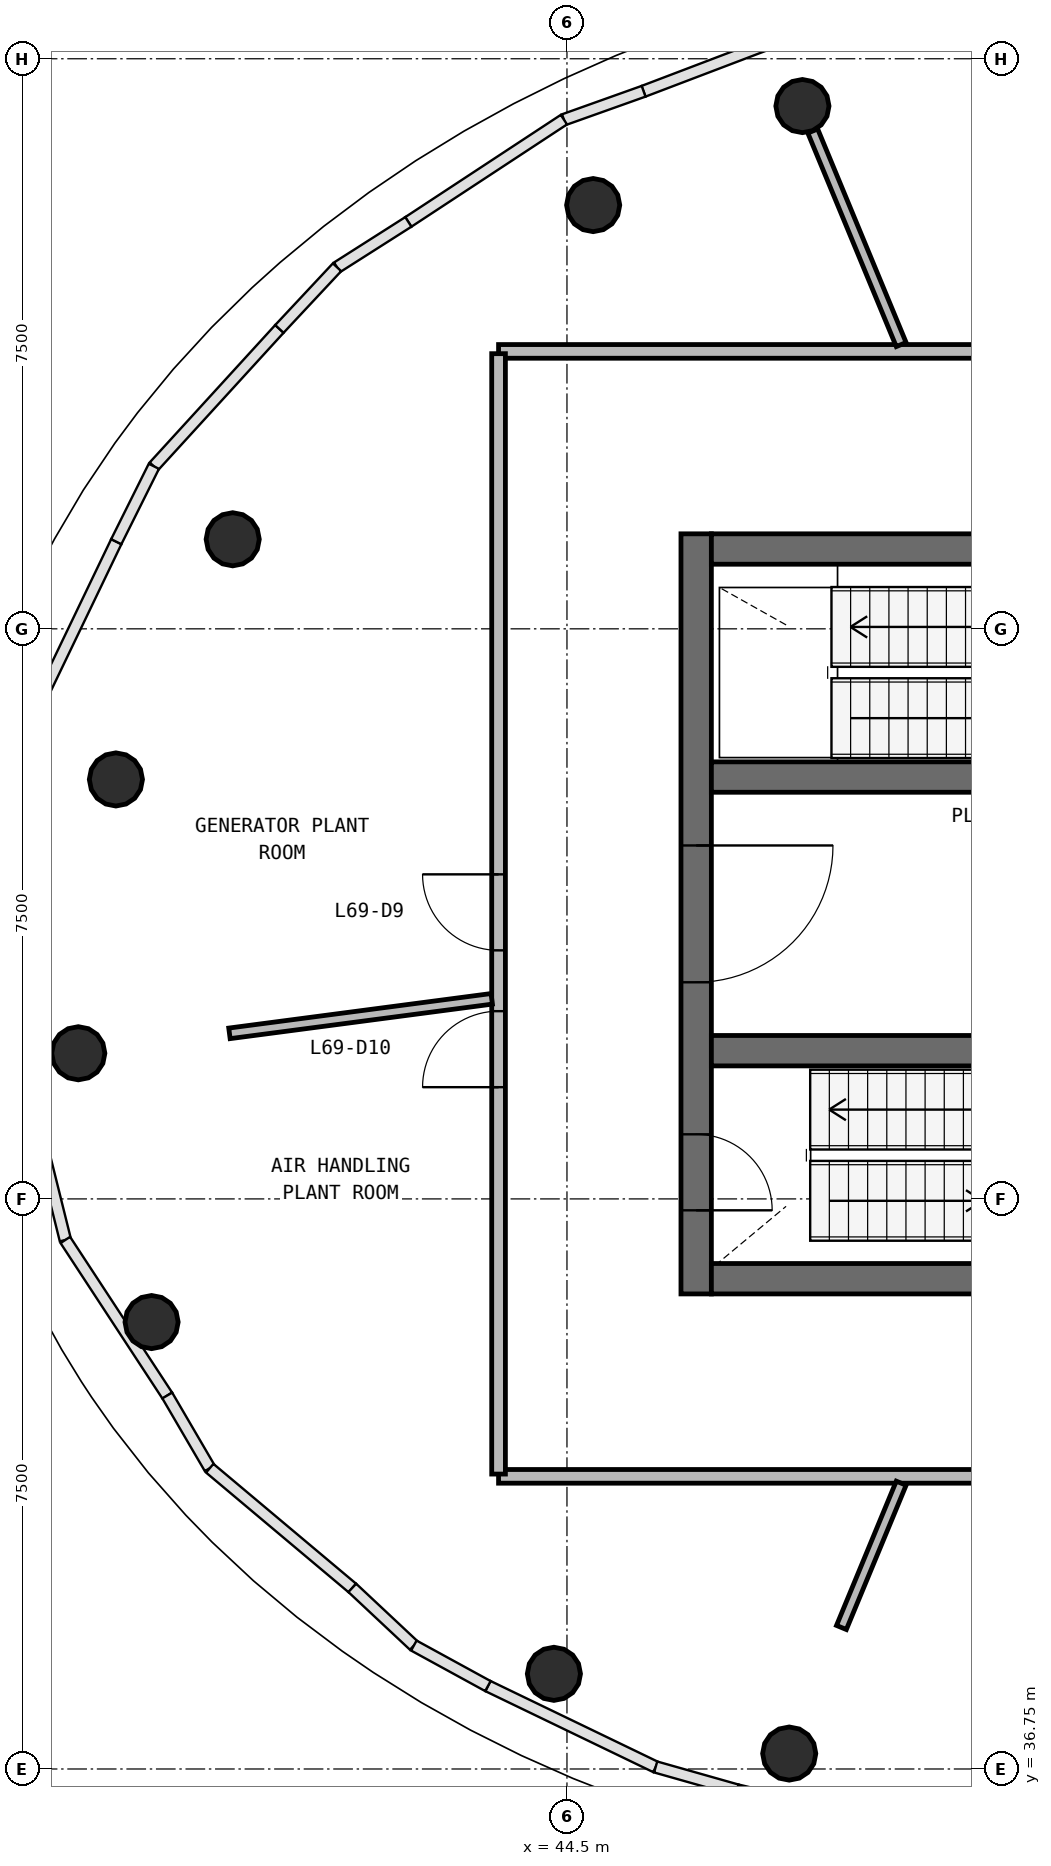
"""IFC4 building model, lengths in metres.
Left out: names, types, materials, properties, quantities, classifications, styles, units other than length and angle.
Written with IfcOpenShell. Run it as: python <this file> out.ifc"""

import sys

from ifc_helpers import new_model, si_unit, direction, frame, frame_2d, origin, origin_2d, place, context, subcontext, project, spatial, rectangle, circle, extrude, source, transform, mapped, element, fill, save


model = new_model("IFC4")
c1 = context("Model", 3, precision=1e-05, world=origin(), true_north=direction((0.0, 1.0)))
c2 = subcontext(c1, "Body", "Model", "MODEL_VIEW")
j1 = project(units=[si_unit("LENGTHUNIT", "METRE"), si_unit("PLANEANGLEUNIT", "RADIAN")], contexts=[c1])
p1 = place(None, origin())
s1 = spatial("IfcSite", under=j1, at=p1, CompositionType="ELEMENT")
p2 = place(p1, origin())
s2 = spatial("IfcBuilding", under=s1, at=p2, CompositionType="ELEMENT")
p3 = place(p2, frame((0.0, 0.0, 280.1)))
s3 = spatial("IfcBuildingStorey", under=s2, at=p3, CompositionType="ELEMENT", Elevation=280.1)
p4 = place(p3, frame((46.2, 53.0, 0.0), z_axis=(0.0, 0.0, 1.0), x_axis=(0.0, -1.0, 0.0)))
e1 = element("IfcWall", 1, at=p4, inside=s3, PredefinedType="SHEAR", context=c2, shape_type="SweptSolid", body=[
    extrude(rectangle(XDim=10.0, YDim=0.4, at=frame_2d((5.0, 0.0))), origin(), (0.0, 0.0, 1.0), 3.5),
])
p5 = place(p4, frame((4.1, 0.0, 0.0)))
e2 = element("IfcOpeningElement", 2, at=p5, cuts=e1, PredefinedType="OPENING", context=c2, shape_type="SweptSolid", body=[
    extrude(rectangle(XDim=1.8, YDim=2.1, at=frame_2d((0.9, 1.05))), frame((0.0, 0.21, 0.0), z_axis=(0.0, -1.0, 0.0), x_axis=(1.0, 0.0, 0.0)), (0.0, 0.0, 1.0), 0.42),
])
p6 = place(p4, frame((7.9, 0.0, 0.0)))
e3 = element("IfcOpeningElement", 3, at=p6, cuts=e1, PredefinedType="OPENING", context=c2, shape_type="SweptSolid", body=[
    extrude(rectangle(XDim=1.0, YDim=2.1, at=frame_2d((0.5, 1.05))), frame((0.0, 0.21, 0.0), z_axis=(0.0, -1.0, 0.0), x_axis=(1.0, 0.0, 0.0)), (0.0, 0.0, 1.0), 0.42),
])
p7 = place(p3, frame((46.4, 43.2, 0.0), z_axis=(0.0, 0.0, 1.0), x_axis=(1.0, 0.0, 0.0)))
e4 = element("IfcWall", 4, at=p7, inside=s3, PredefinedType="SHEAR", context=c2, shape_type="SweptSolid", body=[
    extrude(rectangle(XDim=11.2, YDim=0.4, at=frame_2d((5.6, 0.0))), origin(), (0.0, 0.0, 1.0), 3.5),
])
p8 = place(p3, frame((57.6, 52.8, 0.0), z_axis=(0.0, 0.0, 1.0), x_axis=(-1.0, 0.0, 0.0)))
e5 = element("IfcWall", 5, at=p8, inside=s3, PredefinedType="SHEAR", context=c2, shape_type="SweptSolid", body=[
    extrude(rectangle(XDim=11.2, YDim=0.4, at=frame_2d((5.6, 0.0))), origin(), (0.0, 0.0, 1.0), 3.5),
])
p9 = place(p8, frame((6.1, 0.0, 0.0)))
e6 = element("IfcOpeningElement", 6, at=p9, cuts=e5, PredefinedType="OPENING", context=c2, shape_type="SweptSolid", body=[
    extrude(rectangle(XDim=1.0, YDim=2.1, at=frame_2d((0.5, 1.05))), frame((0.0, 0.21, 0.0), z_axis=(0.0, -1.0, 0.0), x_axis=(1.0, 0.0, 0.0)), (0.0, 0.0, 1.0), 0.42),
])
p10 = place(p3, frame((46.4, 49.8, 0.0), z_axis=(0.0, 0.0, 1.0), x_axis=(1.0, 0.0, 0.0)))
e7 = element("IfcWall", 7, at=p10, inside=s3, PredefinedType="SHEAR", context=c2, shape_type="SweptSolid", body=[
    extrude(rectangle(XDim=11.2, YDim=0.4, at=frame_2d((5.6, 0.0))), origin(), (0.0, 0.0, 1.0), 3.5),
])
p11 = place(p10, frame((8.95, 0.0, 0.0)))
e8 = element("IfcOpeningElement", 8, at=p11, cuts=e7, PredefinedType="OPENING", context=c2, shape_type="SweptSolid", body=[
    extrude(rectangle(XDim=1.1, YDim=2.1, at=frame_2d((0.55, 1.05))), frame((0.0, 0.21, 0.0), z_axis=(0.0, -1.0, 0.0), x_axis=(1.0, 0.0, 0.0)), (0.0, 0.0, 1.0), 0.42),
])
p12 = place(p10, frame((5.65, 0.0, 0.0)))
e9 = element("IfcOpeningElement", 9, at=p12, cuts=e7, PredefinedType="OPENING", context=c2, shape_type="SweptSolid", body=[
    extrude(rectangle(XDim=0.9, YDim=2.1, at=frame_2d((0.45, 1.05))), frame((0.0, 0.21, 0.0), z_axis=(0.0, -1.0, 0.0), x_axis=(1.0, 0.0, 0.0)), (0.0, 0.0, 1.0), 0.42),
])
p13 = place(p3, frame((46.4, 46.2, 0.0), z_axis=(0.0, 0.0, 1.0), x_axis=(1.0, 0.0, 0.0)))
e10 = element("IfcWall", 10, at=p13, inside=s3, PredefinedType="SHEAR", context=c2, shape_type="SweptSolid", body=[
    extrude(rectangle(XDim=11.2, YDim=0.4, at=frame_2d((5.6, 0.0))), origin(), (0.0, 0.0, 1.0), 3.5),
])
p14 = place(p13, frame((5.65, 0.0, 0.0)))
e11 = element("IfcOpeningElement", 11, at=p14, cuts=e10, PredefinedType="OPENING", context=c2, shape_type="SweptSolid", body=[
    extrude(rectangle(XDim=0.9, YDim=2.1, at=frame_2d((0.45, 1.05))), frame((0.0, 0.21, 0.0), z_axis=(0.0, -1.0, 0.0), x_axis=(1.0, 0.0, 0.0)), (0.0, 0.0, 1.0), 0.42),
])
m1 = source(origin(), c2, "Body", "SweptSolid", [
    extrude(circle(Radius=0.35, at=origin_2d()), origin(), (0.0, 0.0, 1.0), 3.747),
])
p15 = place(p3, frame((47.598, 58.628, 0.128), z_axis=(0.136574670104, -0.329773094178, 0.934129041323), x_axis=(0.923901142315, 0.382631257517, 0.0)))
e12 = element("IfcColumn", 12, at=p15, inside=s3, PredefinedType="COLUMN", context=c2, shape_type="MappedRepresentation", body=[
    mapped(m1, transform((0.0, 0.0, 0.0), scale=1.0)),
])
m2 = source(origin(), c2, "Body", "SweptSolid", [
    extrude(circle(Radius=0.35, at=origin_2d()), origin(), (0.0, 0.0, 1.0), 3.739),
])
p16 = place(p3, frame((44.845, 57.325, 0.126), z_axis=(0.213995199353, -0.278905552773, 0.936171857773), x_axis=(0.793376088289, 0.608731782094, 0.0)))
e13 = element("IfcColumn", 13, at=p16, inside=s3, PredefinedType="COLUMN", context=c2, shape_type="MappedRepresentation", body=[
    mapped(m2, transform((0.0, 0.0, 0.0), scale=1.0)),
])
m3 = source(origin(), c2, "Body", "SweptSolid", [
    extrude(circle(Radius=0.35, at=origin_2d()), origin(), (0.0, 0.0, 1.0), 3.807),
])
p17 = place(p3, frame((40.102, 52.928, 0.141), z_axis=(0.363645996148, -0.150626775693, 0.919278610613), x_axis=(0.382682721486, 0.923879826967, 0.0)))
e14 = element("IfcColumn", 14, at=p17, inside=s3, PredefinedType="COLUMN", context=c2, shape_type="MappedRepresentation", body=[
    mapped(m3, transform((0.0, 0.0, 0.0), scale=1.0)),
])
m4 = source(origin(), c2, "Body", "SweptSolid", [
    extrude(circle(Radius=0.35, at=origin_2d()), origin(), (0.0, 0.0, 1.0), 3.898),
])
p18 = place(p3, frame((38.565, 49.769, 0.157), z_axis=(0.436525820631, -0.057493644669, 0.897852821316), x_axis=(0.130579616175, 0.991437826512, 0.0)))
e15 = element("IfcColumn", 15, at=p18, inside=s3, PredefinedType="COLUMN", context=c2, shape_type="MappedRepresentation", body=[
    mapped(m4, transform((0.0, 0.0, 0.0), scale=1.0)),
])
m5 = source(origin(), c2, "Body", "SweptSolid", [
    extrude(circle(Radius=0.35, at=origin_2d()), origin(), (0.0, 0.0, 1.0), 4.014),
])
p19 = place(p3, frame((38.071, 46.166, 0.174), z_axis=(0.485556516608, 0.063978639212, 0.871860999761), x_axis=(-0.130634394046, 0.991430610326, 0.0)))
e16 = element("IfcColumn", 16, at=p19, inside=s3, PredefinedType="COLUMN", context=c2, shape_type="MappedRepresentation", body=[
    mapped(m5, transform((0.0, 0.0, 0.0), scale=1.0)),
])
m6 = source(origin(), c2, "Body", "SweptSolid", [
    extrude(circle(Radius=0.35, at=origin_2d()), origin(), (0.0, 0.0, 1.0), 4.069),
])
p20 = place(p3, frame((39.035, 42.63, 0.181), z_axis=(0.471313444732, 0.195280710616, 0.860075043747), x_axis=(-0.382777607766, 0.923840518159, 0.0)))
e17 = element("IfcColumn", 17, at=p20, inside=s3, PredefinedType="COLUMN", context=c2, shape_type="MappedRepresentation", body=[
    mapped(m6, transform((0.0, 0.0, 0.0), scale=1.0)),
])
m7 = source(origin(), c2, "Body", "SweptSolid", [
    extrude(circle(Radius=0.35, at=origin_2d()), origin(), (0.0, 0.0, 1.0), 3.908),
])
p21 = place(p3, frame((44.328, 38.002, 0.159), z_axis=(0.270876761649, 0.352901943394, 0.89559254036), x_axis=(-0.793260428126, 0.608882495371, 0.0)))
e18 = element("IfcColumn", 18, at=p21, inside=s3, PredefinedType="COLUMN", context=c2, shape_type="MappedRepresentation", body=[
    mapped(m7, transform((0.0, 0.0, 0.0), scale=1.0)),
])
m8 = source(origin(), c2, "Body", "SweptSolid", [
    extrude(circle(Radius=0.35, at=origin_2d()), origin(), (0.0, 0.0, 1.0), 3.834),
])
p22 = place(p3, frame((47.424, 36.953, 0.146), z_axis=(0.156087835133, 0.377005297426, 0.912964179712), x_axis=(-0.923942661325, 0.382530990356, 0.0)))
e19 = element("IfcColumn", 19, at=p22, inside=s3, PredefinedType="COLUMN", context=c2, shape_type="MappedRepresentation", body=[
    mapped(m8, transform((0.0, 0.0, 0.0), scale=1.0)),
])
p23 = place(p3, frame((43.6, 55.4, 0.0), z_axis=(0.0, 0.0, 1.0), x_axis=(1.0, 0.0, 0.0)))
e20 = element("IfcWall", 20, at=p23, inside=s3, PredefinedType="PARTITIONING", context=c2, shape_type="SweptSolid", body=[
    extrude(rectangle(XDim=16.8, YDim=0.18, at=frame_2d((8.4, 0.0))), origin(), (0.0, 0.0, 1.0), 2.62),
])
p24 = place(p23, frame((7.95, 0.0, 0.0)))
e21 = element("IfcOpeningElement", 21, at=p24, cuts=e20, PredefinedType="OPENING", context=c2, shape_type="SweptSolid", body=[
    extrude(rectangle(XDim=1.0, YDim=2.1, at=frame_2d((0.5, 1.05))), frame((0.0, 0.1, 0.0), z_axis=(0.0, -1.0, 0.0), x_axis=(1.0, 0.0, 0.0)), (0.0, 0.0, 1.0), 0.2),
])
p25 = place(p3, frame((60.4, 40.6, 0.0), z_axis=(0.0, 0.0, 1.0), x_axis=(-1.0, 0.0, 0.0)))
e22 = element("IfcWall", 22, at=p25, inside=s3, PredefinedType="PARTITIONING", context=c2, shape_type="SweptSolid", body=[
    extrude(rectangle(XDim=16.8, YDim=0.18, at=frame_2d((8.4, 0.0))), origin(), (0.0, 0.0, 1.0), 2.62),
])
p26 = place(p25, frame((7.95, 0.0, 0.0)))
e23 = element("IfcOpeningElement", 23, at=p26, cuts=e22, PredefinedType="OPENING", context=c2, shape_type="SweptSolid", body=[
    extrude(rectangle(XDim=1.0, YDim=2.1, at=frame_2d((0.5, 1.05))), frame((0.0, 0.1, 0.0), z_axis=(0.0, -1.0, 0.0), x_axis=(1.0, 0.0, 0.0)), (0.0, 0.0, 1.0), 0.2),
])
p27 = place(p3, frame((43.6, 40.63, 0.0), z_axis=(0.0, 0.0, 1.0), x_axis=(0.0, 1.0, 0.0)))
e24 = element("IfcWall", 24, at=p27, inside=s3, PredefinedType="PARTITIONING", context=c2, shape_type="SweptSolid", body=[
    extrude(rectangle(XDim=14.74, YDim=0.18, at=frame_2d((7.37, 0.0))), origin(), (0.0, 0.0, 1.0), 2.62),
])
p28 = place(p27, frame((6.89, 0.0, 0.0)))
e25 = element("IfcOpeningElement", 25, at=p28, cuts=e24, PredefinedType="OPENING", context=c2, shape_type="SweptSolid", body=[
    extrude(rectangle(XDim=1.0, YDim=2.1, at=frame_2d((0.5, 1.05))), frame((0.0, 0.1, 0.0), z_axis=(0.0, -1.0, 0.0), x_axis=(1.0, 0.0, 0.0)), (0.0, 0.0, 1.0), 0.2),
])
p29 = place(p27, frame((5.09, 0.0, 0.0)))
e26 = element("IfcOpeningElement", 26, at=p29, cuts=e24, PredefinedType="OPENING", context=c2, shape_type="SweptSolid", body=[
    extrude(rectangle(XDim=1.0, YDim=2.1, at=frame_2d((0.5, 1.05))), frame((0.0, 0.1, 0.0), z_axis=(0.0, -1.0, 0.0), x_axis=(1.0, 0.0, 0.0)), (0.0, 0.0, 1.0), 0.2),
])
p30 = place(p3, frame((43.51, 46.882, 0.0), z_axis=(0.0, 0.0, 1.0), x_axis=(-0.991442831521, -0.130541609556, 0.0)))
e27 = element("IfcWall", 27, at=p30, inside=s3, PredefinedType="PARTITIONING", context=c2, shape_type="SweptSolid", body=[
    extrude(rectangle(XDim=3.48, YDim=0.14, at=frame_2d((1.74, 0.0))), origin(), (0.0, 0.0, 1.0), 2.62),
])
p31 = place(p3, frame((48.897, 40.51, 0.0), z_axis=(0.0, 0.0, 1.0), x_axis=(-0.382691072611, -0.923876367781, 0.0)))
e28 = element("IfcWall", 28, at=p31, inside=s3, PredefinedType="PARTITIONING", context=c2, shape_type="SweptSolid", body=[
    extrude(rectangle(XDim=2.055, YDim=0.14, at=frame_2d((1.027, 0.0))), origin(), (0.0, 0.0, 1.0), 2.62),
])
p32 = place(p3, frame((48.897, 55.49, 0.0), z_axis=(0.0, 0.0, 1.0), x_axis=(-0.382630688808, 0.923901377844, 0.0)))
e29 = element("IfcWall", 29, at=p32, inside=s3, PredefinedType="PARTITIONING", context=c2, shape_type="SweptSolid", body=[
    extrude(rectangle(XDim=3.041, YDim=0.14, at=frame_2d((1.521, 0.0))), origin(), (0.0, 0.0, 1.0), 2.62),
])
m9 = source(origin(), c2, "Body", "SweptSolid", [
    extrude(rectangle(XDim=1.8, YDim=2.1, at=frame_2d((0.9, 1.05))), frame((0.0, 0.025, 0.0), z_axis=(0.0, -1.0, 0.0), x_axis=(1.0, 0.0, 0.0)), (0.0, 0.0, 1.0), 0.05),
])
p33 = place(p5, origin())
e30 = element("IfcDoor", 30, at=p33, inside=s3, OperationType="SINGLE_SWING_LEFT", PredefinedType="DOOR", context=c2, shape_type="MappedRepresentation", body=[
    mapped(m9, transform((0.0, 0.0, 0.0), scale=1.0)),
])
fill(e2, e30)
m10 = source(origin(), c2, "Body", "SweptSolid", [
    extrude(rectangle(XDim=1.0, YDim=2.1, at=frame_2d((0.5, 1.05))), frame((0.0, 0.025, 0.0), z_axis=(0.0, -1.0, 0.0), x_axis=(1.0, 0.0, 0.0)), (0.0, 0.0, 1.0), 0.05),
])
p34 = place(p6, origin())
e31 = element("IfcDoor", 31, at=p34, inside=s3, OperationType="SINGLE_SWING_RIGHT", PredefinedType="DOOR", context=c2, shape_type="MappedRepresentation", body=[
    mapped(m10, transform((0.0, 0.0, 0.0), scale=1.0)),
])
fill(e3, e31)
m11 = source(origin(), c2, "Body", "SweptSolid", [
    extrude(rectangle(XDim=1.0, YDim=2.1, at=frame_2d((0.5, 1.05))), frame((0.0, 0.025, 0.0), z_axis=(0.0, -1.0, 0.0), x_axis=(1.0, 0.0, 0.0)), (0.0, 0.0, 1.0), 0.05),
])
p35 = place(p28, origin())
e32 = element("IfcDoor", 32, at=p35, inside=s3, OperationType="SINGLE_SWING_RIGHT", PredefinedType="DOOR", context=c2, shape_type="MappedRepresentation", body=[
    mapped(m11, transform((0.0, 0.0, 0.0), scale=1.0)),
])
fill(e25, e32)
p36 = place(p29, origin())
e33 = element("IfcDoor", 33, at=p36, inside=s3, OperationType="SINGLE_SWING_LEFT", PredefinedType="DOOR", context=c2, shape_type="MappedRepresentation", body=[
    mapped(m11, transform((0.0, 0.0, 0.0), scale=1.0)),
])
fill(e26, e33)
save(model, sys.argv[1])
